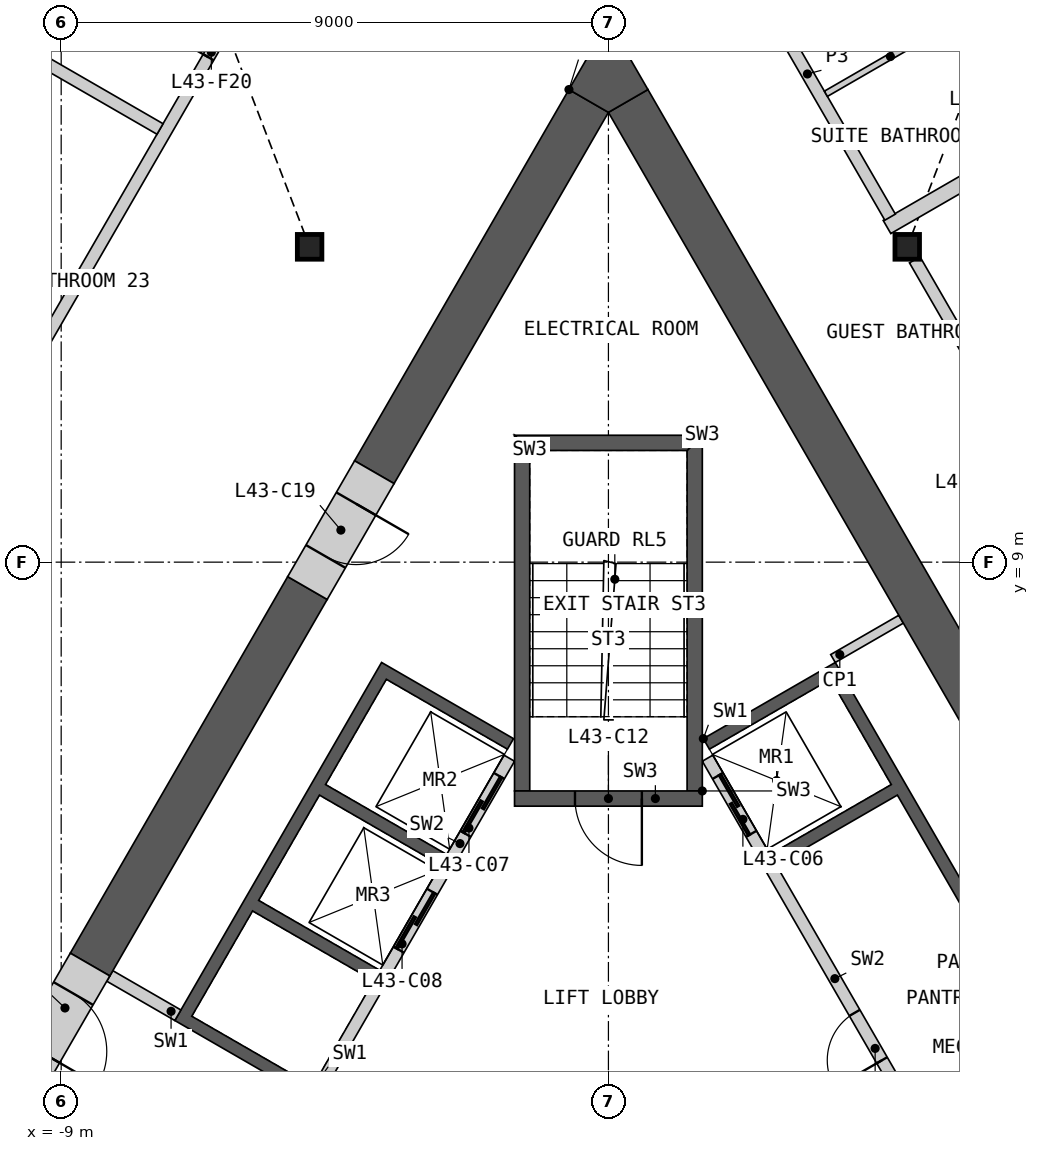
"""IFC4 building model, lengths in metres.
Left out: names, types, materials, properties, quantities, classifications, styles, units other than length and angle.
Written with IfcOpenShell. Run it as: python <this file> out.ifc"""

import sys

from ifc_helpers import new_model, si_unit, direction, frame, frame_2d, origin, origin_2d, place, context, subcontext, project, spatial, polyline, rectangle, i_section, outline, extrude, element, fill, save


model = new_model("IFC4")
c1 = context("Model", 3, precision=1e-05, world=origin(), true_north=direction((0.0, 1.0)))
c2 = subcontext(c1, "Body", "Model", "MODEL_VIEW")
j1 = project(units=[si_unit("LENGTHUNIT", "METRE"), si_unit("PLANEANGLEUNIT", "RADIAN")], contexts=[c1])
p1 = place(None, origin())
s1 = spatial("IfcSite", under=j1, at=p1, CompositionType="ELEMENT")
p2 = place(p1, origin())
s2 = spatial("IfcBuilding", under=s1, at=p2, CompositionType="ELEMENT")
p3 = place(p2, frame((0.0, 0.0, 198.0)))
s3 = spatial("IfcBuildingStorey", under=s2, at=p3, CompositionType="ELEMENT", Elevation=198.0)
for number, where, z_axis, x_axis in (
    (1, (-4.914, 14.186, 0.0), (0.0, 0.0, 1.0), (1.0, 0.0, 0.0)),
    (2, (4.914, 14.186, 0.0), (0.0, 0.0, 1.0), (1.0, 0.0, 0.0)),
):
    element("IfcColumn", number, at=place(p3, frame(where, z_axis=z_axis, x_axis=x_axis)), inside=s3, PredefinedType="COLUMN", context=c2, shape_type="SweptSolid", body=[
        extrude(i_section(OverallWidth=0.404, OverallDepth=0.407, WebThickness=0.027, FlangeThickness=0.044, at=origin_2d()), origin(), (0.0, 0.0, 1.0), 3.6),
    ])
p4 = place(p3, origin())
e3 = element("IfcWall", 3, at=p4, inside=s3, PredefinedType="SHEAR", context=c2, shape_type="SweptSolid", body=[
    extrude(outline(polyline([(1.561, 6.097), (3.731, 7.35), (8.231, -0.444), (6.061, -1.697), (5.96, -1.524), (7.952, -0.374), (4.752, 5.169), (2.76, 4.019), (2.66, 4.192), (4.652, 5.342), (3.652, 7.074), (1.66, 5.924), (1.561, 6.097)])), origin(), (0.0, 0.0, 1.0), 3.25),
])
p5 = place(p3, frame((5.817, -1.476, 0.0), z_axis=(0.0, 0.0, 1.0), x_axis=(-0.500002616675, 0.866023893041, 0.0)))
e4 = element("IfcWall", 4, at=p5, inside=s3, PredefinedType="SOLIDWALL", context=c2, shape_type="SweptSolid", body=[
    extrude(rectangle(XDim=8.373, YDim=0.2, at=frame_2d((4.187, 0.0))), origin(), (0.0, 0.0, 1.0), 3.25),
])
p6 = place(p5, frame((2.637, 0.0, 0.0)))
e5 = element("IfcOpeningElement", 5, at=p6, cuts=e4, PredefinedType="OPENING", context=c2, shape_type="SweptSolid", body=[
    extrude(rectangle(XDim=0.9, YDim=2.1, at=frame_2d((0.45, 1.05))), frame((0.0, 0.11, 0.0), z_axis=(0.0, -1.0, 0.0), x_axis=(1.0, 0.0, 0.0)), (0.0, 0.0, 1.0), 0.22),
])
p7 = place(p5, frame((6.937, 0.0, 0.0)))
e6 = element("IfcOpeningElement", 6, at=p7, cuts=e4, PredefinedType="OPENING", context=c2, shape_type="SweptSolid", body=[
    extrude(rectangle(XDim=1.1, YDim=2.1, at=frame_2d((0.55, 1.05))), frame((0.0, 0.11, 0.0), z_axis=(0.0, -1.0, 0.0), x_axis=(1.0, 0.0, 0.0)), (0.0, 0.0, 1.0), 0.22),
])
p8 = place(p3, origin())
e7 = element("IfcWall", 7, at=p8, inside=s3, PredefinedType="SHEAR", context=c2, shape_type="SweptSolid", body=[
    extrude(outline(polyline([(-4.96, 0.208), (-7.131, 1.461), (-3.731, 7.35), (-1.561, 6.097), (-1.66, 5.924), (-3.652, 7.074), (-4.652, 5.342), (-2.66, 4.192), (-2.76, 4.019), (-4.752, 5.169), (-5.752, 3.437), (-3.76, 2.287), (-3.861, 2.113), (-5.852, 3.263), (-6.852, 1.531), (-4.861, 0.381), (-4.96, 0.208)])), origin(), (0.0, 0.0, 1.0), 3.25),
])
p9 = place(p3, frame((-1.631, 5.776, 0.0), z_axis=(0.0, 0.0, 1.0), x_axis=(-0.499992876559, -0.866029516466, 0.0)))
e8 = element("IfcWall", 8, at=p9, inside=s3, PredefinedType="SOLIDWALL", context=c2, shape_type="SweptSolid", body=[
    extrude(rectangle(XDim=6.486, YDim=0.2, at=frame_2d((3.243, 0.0))), origin(), (0.0, 0.0, 1.0), 3.25),
])
p10 = place(p9, frame((0.337, 0.0, 0.0)))
e9 = element("IfcOpeningElement", 9, at=p10, cuts=e8, PredefinedType="OPENING", context=c2, shape_type="SweptSolid", body=[
    extrude(rectangle(XDim=1.1, YDim=2.1, at=frame_2d((0.55, 1.05))), frame((0.0, 0.11, 0.0), z_axis=(0.0, -1.0, 0.0), x_axis=(1.0, 0.0, 0.0)), (0.0, 0.0, 1.0), 0.22),
])
p11 = place(p9, frame((2.537, 0.0, 0.0)))
e10 = element("IfcOpeningElement", 10, at=p11, cuts=e8, PredefinedType="OPENING", context=c2, shape_type="SweptSolid", body=[
    extrude(rectangle(XDim=1.1, YDim=2.1, at=frame_2d((0.55, 1.05))), frame((0.0, 0.11, 0.0), z_axis=(0.0, -1.0, 0.0), x_axis=(1.0, 0.0, 0.0)), (0.0, 0.0, 1.0), 0.22),
])
p12 = place(p3, frame((-7.081, 1.548, 0.0), z_axis=(0.0, 0.0, 1.0), x_axis=(-0.866003189247, 0.500038474733, 0.0)))
e11 = element("IfcWall", 11, at=p12, inside=s3, PredefinedType="SHEAR", context=c2, shape_type="SweptSolid", body=[
    extrude(rectangle(XDim=1.293, YDim=0.2, at=frame_2d((0.646, 0.0))), origin(), (0.0, 0.0, 1.0), 3.25),
])
p13 = place(p3, origin())
e12 = element("IfcWall", 12, at=p13, inside=s3, PredefinedType="SHEAR", context=c2, shape_type="SweptSolid", body=[
    extrude(outline(polyline([(1.544, 5.237), (1.544, 11.087), (1.294, 10.837), (1.294, 5.237), (1.544, 5.237)])), origin(), (0.0, 0.0, 1.0), 3.25),
])
p14 = place(p3, origin())
e13 = element("IfcWall", 13, at=p14, inside=s3, PredefinedType="SHEAR", context=c2, shape_type="SweptSolid", body=[
    extrude(outline(polyline([(1.544, 11.087), (-1.544, 11.087), (-1.294, 10.837), (1.294, 10.837), (1.544, 11.087)])), origin(), (0.0, 0.0, 1.0), 3.25),
])
p15 = place(p3, origin())
e14 = element("IfcWall", 14, at=p15, inside=s3, PredefinedType="SHEAR", context=c2, shape_type="SweptSolid", body=[
    extrude(outline(polyline([(-1.294, 10.837), (-1.544, 11.087), (-1.544, 5.237), (-1.294, 5.237), (-1.294, 10.837)])), origin(), (0.0, 0.0, 1.0), 3.25),
])
p16 = place(p3, frame((1.544, 5.112, 0.0), z_axis=(0.0, 0.0, 1.0), x_axis=(-1.0, 0.0, 0.0)))
e15 = element("IfcWall", 15, at=p16, inside=s3, PredefinedType="SHEAR", context=c2, shape_type="SweptSolid", body=[
    extrude(rectangle(XDim=3.088, YDim=0.25, at=frame_2d((1.544, 0.0))), origin(), (0.0, 0.0, 1.0), 3.25),
])
p17 = place(p16, frame((0.994, 0.0, 0.0)))
e16 = element("IfcOpeningElement", 16, at=p17, cuts=e15, PredefinedType="OPENING", context=c2, shape_type="SweptSolid", body=[
    extrude(rectangle(XDim=1.1, YDim=2.1, at=frame_2d((0.55, 1.05))), frame((0.0, 0.135, 0.0), z_axis=(0.0, -1.0, 0.0), x_axis=(1.0, 0.0, 0.0)), (0.0, 0.0, 1.0), 0.27),
])
p18 = place(p3, frame((3.693, 7.415, 0.0), z_axis=(0.0, 0.0, 1.0), x_axis=(0.866003189247, 0.500038474733, 0.0)))
e17 = element("IfcWall", 17, at=p18, inside=s3, PredefinedType="PARTITIONING", context=c2, shape_type="SweptSolid", body=[
    extrude(rectangle(XDim=1.293, YDim=0.15, at=frame_2d((0.646, 0.0))), origin(), (0.0, 0.0, 1.0), 3.25),
])
p19 = place(p3, frame((6.875, 5.24, 0.0), z_axis=(0.0, 0.0, 1.0), x_axis=(-0.499997217876, 0.866027010039, 0.0)))
e18 = element("IfcWall", 18, at=p19, inside=s3, PredefinedType="SHEAR", context=c2, shape_type="SweptSolid", body=[
    extrude(rectangle(XDim=13.101, YDim=0.75, at=frame_2d((6.551, 0.0))), origin(), (0.0, 0.0, 1.0), 3.25),
])
p20 = place(p3, frame((-4.95, 8.574, 0.0), z_axis=(0.0, 0.0, 1.0), x_axis=(-0.499987463267, -0.866032641749, 0.0)))
e19 = element("IfcWall", 19, at=p20, inside=s3, PredefinedType="SHEAR", context=c2, shape_type="SweptSolid", body=[
    extrude(rectangle(XDim=7.151, YDim=0.75, at=frame_2d((3.575, 0.0))), origin(), (0.0, 0.0, 1.0), 3.25),
])
p21 = place(p3, frame((-0.325, 16.585, 0.0), z_axis=(0.0, 0.0, 1.0), x_axis=(-0.500012199891, -0.86601836006, 0.0)))
e20 = element("IfcWall", 20, at=p21, inside=s3, PredefinedType="SHEAR", context=c2, shape_type="SweptSolid", body=[
    extrude(rectangle(XDim=7.051, YDim=0.75, at=frame_2d((3.525, 0.0))), origin(), (0.0, 0.0, 1.0), 3.25),
])
p22 = place(p3, origin())
e21 = element("IfcWall", 21, at=p22, inside=s3, PredefinedType="SHEAR", context=c2, shape_type="SweptSolid", body=[
    extrude(outline(polyline([(-0.649, 16.773), (0.0, 17.898), (0.649, 16.773), (0.0, 16.398), (-0.649, 16.773)])), origin(), (0.0, 0.0, 1.0), 3.25),
])
p23 = place(p3, frame((-3.85, 10.479, 0.0), z_axis=(0.0, 0.0, 1.0), x_axis=(-0.499946605688, -0.86605622881, 0.0)))
e22 = element("IfcWall", 22, at=p23, inside=s3, PredefinedType="SHEAR", context=c2, shape_type="SweptSolid", body=[
    extrude(rectangle(XDim=2.2, YDim=0.75, at=frame_2d((1.1, 0.0))), origin(), (0.0, 0.0, 1.0), 3.25),
])
p24 = place(p23, frame((0.6, 0.0, 0.0)))
e23 = element("IfcOpeningElement", 23, at=p24, cuts=e22, PredefinedType="OPENING", context=c2, shape_type="SweptSolid", body=[
    extrude(rectangle(XDim=1.0, YDim=2.1, at=frame_2d((0.5, 1.05))), frame((0.0, 0.385, 0.0), z_axis=(0.0, -1.0, 0.0), x_axis=(1.0, 0.0, 0.0)), (0.0, 0.0, 1.0), 0.77),
])
p25 = place(p3, frame((-8.525, 2.382, 0.0), z_axis=(0.0, 0.0, 1.0), x_axis=(-0.500077893725, -0.86598042715, 0.0)))
e24 = element("IfcWall", 24, at=p25, inside=s3, PredefinedType="SHEAR", context=c2, shape_type="SweptSolid", body=[
    extrude(rectangle(XDim=2.2, YDim=0.75, at=frame_2d((1.1, 0.0))), origin(), (0.0, 0.0, 1.0), 3.25),
])
p26 = place(p25, frame((0.55, 0.0, 0.0)))
e25 = element("IfcOpeningElement", 25, at=p26, cuts=e24, PredefinedType="OPENING", context=c2, shape_type="SweptSolid", body=[
    extrude(rectangle(XDim=1.1, YDim=2.1, at=frame_2d((0.55, 1.05))), frame((0.0, 0.385, 0.0), z_axis=(0.0, -1.0, 0.0), x_axis=(1.0, 0.0, 0.0)), (0.0, 0.0, 1.0), 0.77),
])
p27 = place(p3, frame((-19.476, -5.035, 0.0), z_axis=(0.0, 0.0, 1.0), x_axis=(0.500000757641, 0.86602496636, 0.0)))
e26 = element("IfcWall", 26, at=p27, inside=s3, PredefinedType="PARTITIONING", context=c2, shape_type="SweptSolid", body=[
    extrude(rectangle(XDim=28.198, YDim=0.2, at=frame_2d((14.099, 0.0))), origin(), (0.0, 0.0, 1.0), 3.25),
])
p28 = place(p27, frame((25.796, 0.0, 0.0)))
e27 = element("IfcOpeningElement", 27, at=p28, cuts=e26, PredefinedType="OPENING", context=c2, shape_type="SweptSolid", body=[
    extrude(rectangle(XDim=0.95, YDim=2.1, at=frame_2d((0.475, 1.05))), frame((0.0, 0.11, 0.0), z_axis=(0.0, -1.0, 0.0), x_axis=(1.0, 0.0, 0.0)), (0.0, 0.0, 1.0), 0.22),
])
p29 = place(p27, frame((14.603, 0.0, 0.0)))
e28 = element("IfcOpeningElement", 28, at=p29, cuts=e26, PredefinedType="OPENING", context=c2, shape_type="SweptSolid", body=[
    extrude(rectangle(XDim=1.1, YDim=2.1, at=frame_2d((0.55, 1.05))), frame((0.0, 0.11, 0.0), z_axis=(0.0, -1.0, 0.0), x_axis=(1.0, 0.0, 0.0)), (0.0, 0.0, 1.0), 0.22),
])
p30 = place(p27, frame((11.993, 0.0, 0.0)))
e29 = element("IfcOpeningElement", 29, at=p30, cuts=e26, PredefinedType="OPENING", context=c2, shape_type="SweptSolid", body=[
    extrude(rectangle(XDim=1.1, YDim=2.1, at=frame_2d((0.55, 1.05))), frame((0.0, 0.11, 0.0), z_axis=(0.0, -1.0, 0.0), x_axis=(1.0, 0.0, 0.0)), (0.0, 0.0, 1.0), 0.22),
])
p31 = place(p27, frame((1.452, 0.0, 0.0)))
e30 = element("IfcOpeningElement", 30, at=p31, cuts=e26, PredefinedType="OPENING", context=c2, shape_type="SweptSolid", body=[
    extrude(rectangle(XDim=0.95, YDim=2.1, at=frame_2d((0.475, 1.05))), frame((0.0, 0.11, 0.0), z_axis=(0.0, -1.0, 0.0), x_axis=(1.0, 0.0, 0.0)), (0.0, 0.0, 1.0), 0.22),
])
p32 = place(p3, frame((4.582, 14.512, 0.0), z_axis=(0.0, 0.0, 1.0), x_axis=(0.866027263711, 0.4999967785, 0.0)))
e31 = element("IfcWall", 31, at=p32, inside=s3, PredefinedType="PARTITIONING", context=c2, shape_type="SweptSolid", body=[
    extrude(rectangle(XDim=12.994, YDim=0.25, at=frame_2d((6.497, 0.0))), origin(), (0.0, 0.0, 1.0), 2.404),
])
p33 = place(p3, frame((5.038, 13.972, 0.0), z_axis=(0.0, 0.0, 1.0), x_axis=(0.50000393355, -0.866023132736, 0.0)))
e32 = element("IfcWall", 32, at=p33, inside=s3, PredefinedType="PARTITIONING", context=c2, shape_type="SweptSolid", body=[
    extrude(rectangle(XDim=9.335, YDim=0.2, at=frame_2d((4.667, 0.0))), origin(), (0.0, 0.0, 1.0), 3.25),
])
p34 = place(p33, frame((5.979, 0.0, 0.0)))
e33 = element("IfcOpeningElement", 33, at=p34, cuts=e32, PredefinedType="OPENING", context=c2, shape_type="SweptSolid", body=[
    extrude(rectangle(XDim=1.8, YDim=2.1, at=frame_2d((0.9, 1.05))), frame((0.0, 0.11, 0.0), z_axis=(0.0, -1.0, 0.0), x_axis=(1.0, 0.0, 0.0)), (0.0, 0.0, 1.0), 0.22),
])
p35 = place(p33, frame((3.163, 0.0, 0.0)))
e34 = element("IfcOpeningElement", 34, at=p35, cuts=e32, PredefinedType="OPENING", context=c2, shape_type="SweptSolid", body=[
    extrude(rectangle(XDim=1.0, YDim=2.1, at=frame_2d((0.5, 1.05))), frame((0.0, 0.11, 0.0), z_axis=(0.0, -1.0, 0.0), x_axis=(1.0, 0.0, 0.0)), (0.0, 0.0, 1.0), 0.22),
])
p36 = place(p3, frame((1.913, 19.385, 0.0), z_axis=(0.0, 0.0, 1.0), x_axis=(0.499972435384, -0.866041317638, 0.0)))
e35 = element("IfcWall", 35, at=p36, inside=s3, PredefinedType="PARTITIONING", context=c2, shape_type="SweptSolid", body=[
    extrude(rectangle(XDim=5.439, YDim=0.2, at=frame_2d((2.719, 0.0))), origin(), (0.0, 0.0, 1.0), 3.25),
])
p37 = place(p36, frame((0.351, 0.0, 0.0)))
e36 = element("IfcOpeningElement", 36, at=p37, cuts=e35, PredefinedType="OPENING", context=c2, shape_type="SweptSolid", body=[
    extrude(rectangle(XDim=1.1, YDim=2.1, at=frame_2d((0.55, 1.05))), frame((0.0, 0.11, 0.0), z_axis=(0.0, -1.0, 0.0), x_axis=(1.0, 0.0, 0.0)), (0.0, 0.0, 1.0), 0.22),
])
p38 = place(p3, frame((-15.835, 21.009, 0.0), z_axis=(0.0, 0.0, 1.0), x_axis=(0.866024525919, -0.500001520505, 0.0)))
e37 = element("IfcWall", 37, at=p38, inside=s3, PredefinedType="PARTITIONING", context=c2, shape_type="SweptSolid", body=[
    extrude(rectangle(XDim=9.769, YDim=0.2, at=frame_2d((4.885, 0.0))), origin(), (0.0, 0.0, 1.0), 2.404),
])
p39 = place(p3, frame((5.717, 17.996, 0.0), z_axis=(0.0, 0.0, 1.0), x_axis=(0.500027264788, -0.866009661879, 0.0)))
e38 = element("IfcWall", 38, at=p39, inside=s3, PredefinedType="PARTITIONING", context=c2, shape_type="SweptSolid", body=[
    extrude(rectangle(XDim=5.2, YDim=0.1, at=frame_2d((2.6, 0.0))), origin(), (0.0, 0.0, 1.0), 2.404),
])
p40 = place(p39, frame((4.0, 0.0, 0.0)))
e39 = element("IfcOpeningElement", 39, at=p40, cuts=e38, PredefinedType="OPENING", context=c2, shape_type="SweptSolid", body=[
    extrude(rectangle(XDim=0.95, YDim=2.1, at=frame_2d((0.475, 1.05))), frame((0.0, 0.06, 0.0), z_axis=(0.0, -1.0, 0.0), x_axis=(1.0, 0.0, 0.0)), (0.0, 0.0, 1.0), 0.12),
])
p41 = place(p39, frame((0.25, 0.0, 0.0)))
e40 = element("IfcOpeningElement", 40, at=p41, cuts=e38, PredefinedType="OPENING", context=c2, shape_type="SweptSolid", body=[
    extrude(rectangle(XDim=0.95, YDim=2.1, at=frame_2d((0.475, 1.05))), frame((0.0, 0.06, 0.0), z_axis=(0.0, -1.0, 0.0), x_axis=(1.0, 0.0, 0.0)), (0.0, 0.0, 1.0), 0.12),
])
p42 = place(p3, frame((3.576, 16.703, 0.0), z_axis=(0.0, 0.0, 1.0), x_axis=(0.866057815567, 0.499943856944, 0.0)))
e41 = element("IfcWall", 41, at=p42, inside=s3, PredefinedType="PARTITIONING", context=c2, shape_type="SweptSolid", body=[
    extrude(rectangle(XDim=2.45, YDim=0.1, at=frame_2d((1.225, 0.0))), origin(), (0.0, 0.0, 1.0), 2.404),
])
p43 = place(p3, frame((-10.996, 14.752, 0.0), z_axis=(0.0, 0.0, 1.0), x_axis=(0.866014668023, -0.500018594424, 0.0)))
e42 = element("IfcWall", 42, at=p43, inside=s3, PredefinedType="PARTITIONING", context=c2, shape_type="SweptSolid", body=[
    extrude(rectangle(XDim=2.45, YDim=0.1, at=frame_2d((1.225, 0.0))), origin(), (0.0, 0.0, 1.0), 2.404),
])
p44 = place(p6, origin())
e43 = element("IfcDoor", 43, at=p44, inside=s3, OperationType="SINGLE_SWING_LEFT", PredefinedType="DOOR", context=c2, shape_type="SweptSolid", body=[
    extrude(rectangle(XDim=0.9, YDim=2.1, at=frame_2d((0.45, 1.05))), frame((0.0, 0.025, 0.0), z_axis=(0.0, -1.0, 0.0), x_axis=(1.0, 0.0, 0.0)), (0.0, 0.0, 1.0), 0.05),
])
fill(e5, e43)
p45 = place(p7, origin())
e44 = element("IfcDoor", 44, at=p45, inside=s3, OperationType="SLIDING_TO_LEFT", PredefinedType="DOOR", context=c2, shape_type="SweptSolid", body=[
    extrude(rectangle(XDim=1.1, YDim=2.1, at=frame_2d((0.55, 1.05))), frame((0.0, 0.025, 0.0), z_axis=(0.0, -1.0, 0.0), x_axis=(1.0, 0.0, 0.0)), (0.0, 0.0, 1.0), 0.05),
])
fill(e6, e44)
p46 = place(p10, origin())
e45 = element("IfcDoor", 45, at=p46, inside=s3, OperationType="SLIDING_TO_LEFT", PredefinedType="DOOR", context=c2, shape_type="SweptSolid", body=[
    extrude(rectangle(XDim=1.1, YDim=2.1, at=frame_2d((0.55, 1.05))), frame((0.0, 0.025, 0.0), z_axis=(0.0, -1.0, 0.0), x_axis=(1.0, 0.0, 0.0)), (0.0, 0.0, 1.0), 0.05),
])
fill(e9, e45)
p47 = place(p11, origin())
e46 = element("IfcDoor", 46, at=p47, inside=s3, OperationType="SLIDING_TO_LEFT", PredefinedType="DOOR", context=c2, shape_type="SweptSolid", body=[
    extrude(rectangle(XDim=1.1, YDim=2.1, at=frame_2d((0.55, 1.05))), frame((0.0, 0.025, 0.0), z_axis=(0.0, -1.0, 0.0), x_axis=(1.0, 0.0, 0.0)), (0.0, 0.0, 1.0), 0.05),
])
fill(e10, e46)
p48 = place(p17, origin())
e47 = element("IfcDoor", 47, at=p48, inside=s3, OperationType="SINGLE_SWING_LEFT", PredefinedType="DOOR", context=c2, shape_type="SweptSolid", body=[
    extrude(rectangle(XDim=1.1, YDim=2.1, at=frame_2d((0.55, 1.05))), frame((0.0, 0.025, 0.0), z_axis=(0.0, -1.0, 0.0), x_axis=(1.0, 0.0, 0.0)), (0.0, 0.0, 1.0), 0.05),
])
fill(e16, e47)
p49 = place(p24, origin())
e48 = element("IfcDoor", 48, at=p49, inside=s3, OperationType="SINGLE_SWING_LEFT", PredefinedType="DOOR", context=c2, shape_type="SweptSolid", body=[
    extrude(rectangle(XDim=1.0, YDim=2.1, at=frame_2d((0.5, 1.05))), frame((0.0, 0.13, 0.0), z_axis=(0.0, -1.0, 0.0), x_axis=(1.0, 0.0, 0.0)), (0.0, 0.0, 1.0), 0.05),
])
fill(e23, e48)
p50 = place(p26, origin())
e49 = element("IfcDoor", 49, at=p50, inside=s3, OperationType="SINGLE_SWING_RIGHT", PredefinedType="DOOR", context=c2, shape_type="SweptSolid", body=[
    extrude(rectangle(XDim=1.1, YDim=2.1, at=frame_2d((0.55, 1.05))), frame((0.0, 0.13, 0.0), z_axis=(0.0, -1.0, 0.0), x_axis=(1.0, 0.0, 0.0)), (0.0, 0.0, 1.0), 0.05),
])
fill(e25, e49)
p51 = place(p28, origin())
e50 = element("IfcDoor", 50, at=p51, inside=s3, OperationType="SINGLE_SWING_LEFT", PredefinedType="DOOR", context=c2, shape_type="SweptSolid", body=[
    extrude(rectangle(XDim=0.95, YDim=2.1, at=frame_2d((0.475, 1.05))), frame((0.0, 0.025, 0.0), z_axis=(0.0, -1.0, 0.0), x_axis=(1.0, 0.0, 0.0)), (0.0, 0.0, 1.0), 0.05),
])
fill(e27, e50)
save(model, sys.argv[1])
